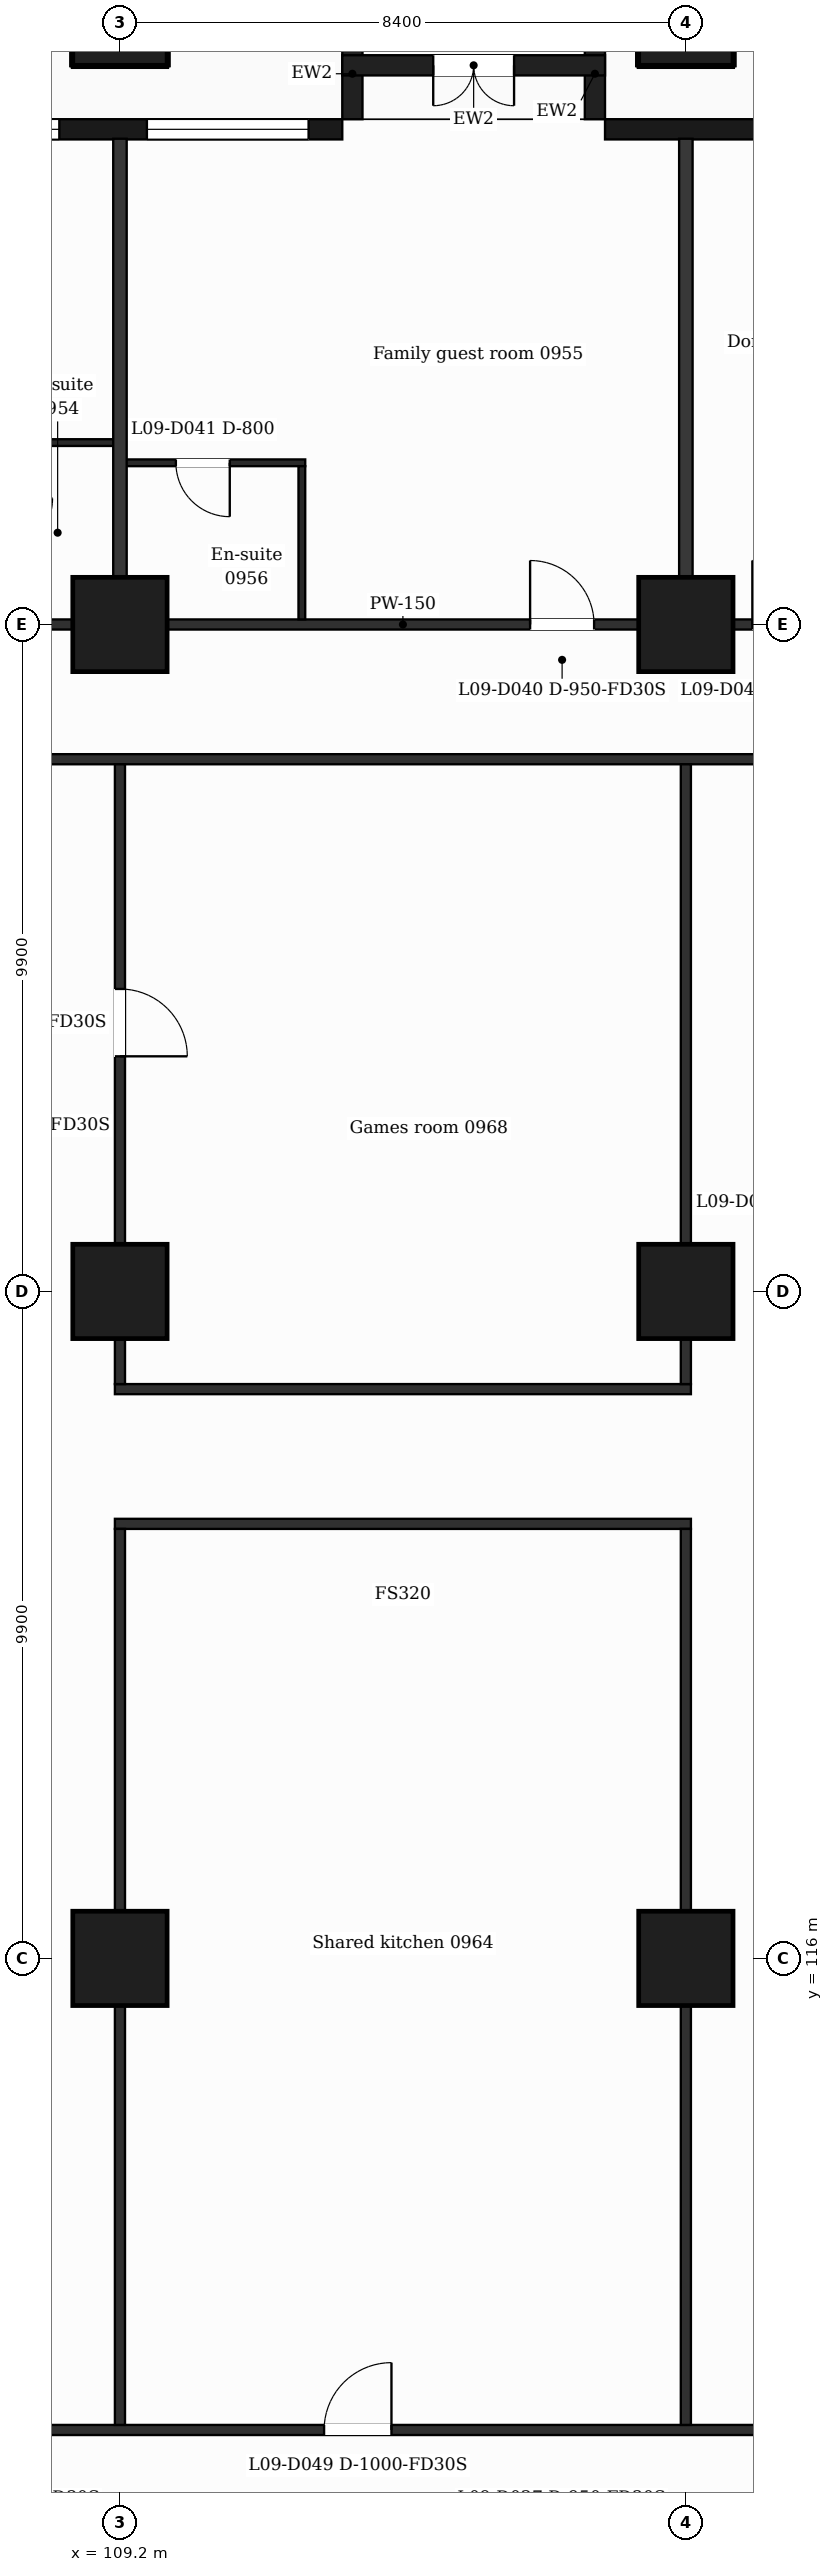
"""IFC4 building model, lengths in metres.
Left out: names, types, materials, properties, quantities, classifications, styles, units other than length and angle.
Written with IfcOpenShell. Run it as: python <this file> out.ifc"""

import sys

from ifc_helpers import new_model, si_unit, direction, frame, frame_2d, origin, origin_2d, place, context, subcontext, project, spatial, rectangle, extrude, element, fill, save


model = new_model("IFC4")
c1 = context("Model", 3, precision=1e-05, world=origin(), true_north=direction((0.0, 1.0)))
c2 = subcontext(c1, "Body", "Model", "MODEL_VIEW")
j1 = project(units=[si_unit("LENGTHUNIT", "METRE"), si_unit("PLANEANGLEUNIT", "RADIAN")], contexts=[c1])
p1 = place(None, origin())
s1 = spatial("IfcSite", under=j1, at=p1, CompositionType="ELEMENT")
p2 = place(p1, origin())
s2 = spatial("IfcBuilding", under=s1, at=p2, CompositionType="ELEMENT")
p3 = place(p2, frame((0.0, 0.0, 49.5)))
s3 = spatial("IfcBuildingStorey", under=s2, at=p3, CompositionType="ELEMENT", Elevation=49.5)
for number, where, z_axis, x_axis in (
    (1, (109.2, 116.0, 0.0), (0.0, 0.0, 1.0), (1.0, 0.0, 0.0)),
    (2, (117.6, 116.0, 0.0), (0.0, 0.0, 1.0), (1.0, 0.0, 0.0)),
    (3, (109.2, 125.9, 0.0), (0.0, 0.0, 1.0), (1.0, 0.0, 0.0)),
    (4, (117.6, 125.9, 0.0), (0.0, 0.0, 1.0), (1.0, 0.0, 0.0)),
    (5, (109.2, 135.8, 0.0), (0.0, 0.0, 1.0), (1.0, 0.0, 0.0)),
    (6, (117.6, 135.8, 0.0), (0.0, 0.0, 1.0), (1.0, 0.0, 0.0)),
    (7, (109.2, 144.8, 0.0), (0.0, 0.0, 1.0), (1.0, 0.0, 0.0)),
    (8, (117.6, 144.8, 0.0), (0.0, 0.0, 1.0), (1.0, 0.0, 0.0)),
):
    element("IfcColumn", number, at=place(p3, frame(where, z_axis=z_axis, x_axis=x_axis)), inside=s3, PredefinedType="COLUMN", context=c2, shape_type="SweptSolid", body=[
        extrude(rectangle(XDim=1.4, YDim=1.4, at=origin_2d()), origin(), (0.0, 0.0, 1.0), 3.5),
    ])
p4 = place(p3, frame((130.65, 143.15, 0.0), z_axis=(0.0, 0.0, 1.0), x_axis=(-1.0, 0.0, 0.0)))
e9 = element("IfcWall", 9, at=p4, inside=s3, PredefinedType="SOLIDWALL", context=c2, shape_type="SweptSolid", body=[
    extrude(rectangle(XDim=14.25, YDim=0.3, at=frame_2d((7.125, 0.0))), origin(), (0.0, 0.0, 1.0), 3.18),
])
p5 = place(p4, frame((1.35, 0.0, 0.9)))
e10 = element("IfcOpeningElement", 10, at=p5, cuts=e9, PredefinedType="OPENING", context=c2, shape_type="SweptSolid", body=[
    extrude(rectangle(XDim=2.4, YDim=2.1, at=frame_2d((1.2, 1.05))), frame((0.0, 0.16, 0.0), z_axis=(0.0, -1.0, 0.0), x_axis=(1.0, 0.0, 0.0)), (0.0, 0.0, 1.0), 0.32),
])
p6 = place(p4, frame((6.15, 0.0, 0.0)))
e11 = element("IfcOpeningElement", 11, at=p6, cuts=e9, PredefinedType="OPENING", context=c2, shape_type="SweptSolid", body=[
    extrude(rectangle(XDim=1.2, YDim=2.4, at=frame_2d((0.6, 1.2))), frame((0.0, 0.16, 0.0), z_axis=(0.0, -1.0, 0.0), x_axis=(1.0, 0.0, 0.0)), (0.0, 0.0, 1.0), 0.32),
])
p7 = place(p4, frame((10.35, 0.0, 0.9)))
e12 = element("IfcOpeningElement", 12, at=p7, cuts=e9, PredefinedType="OPENING", context=c2, shape_type="SweptSolid", body=[
    extrude(rectangle(XDim=1.2, YDim=2.1, at=frame_2d((0.6, 1.05))), frame((0.0, 0.16, 0.0), z_axis=(0.0, -1.0, 0.0), x_axis=(1.0, 0.0, 0.0)), (0.0, 0.0, 1.0), 0.32),
])
p8 = place(p3, frame((112.5, 143.15, 0.0), z_axis=(0.0, 0.0, 1.0), x_axis=(-1.0, 0.0, 0.0)))
e13 = element("IfcWall", 13, at=p8, inside=s3, PredefinedType="SOLIDWALL", context=c2, shape_type="SweptSolid", body=[
    extrude(rectangle(XDim=16.5, YDim=0.3, at=frame_2d((8.25, 0.0))), origin(), (0.0, 0.0, 1.0), 3.18),
])
p9 = place(p8, frame((0.5, 0.0, 0.9)))
e14 = element("IfcOpeningElement", 14, at=p9, cuts=e13, PredefinedType="OPENING", context=c2, shape_type="SweptSolid", body=[
    extrude(rectangle(XDim=2.4, YDim=2.1, at=frame_2d((1.2, 1.05))), frame((0.0, 0.16, 0.0), z_axis=(0.0, -1.0, 0.0), x_axis=(1.0, 0.0, 0.0)), (0.0, 0.0, 1.0), 0.32),
])
p10 = place(p8, frame((4.2, 0.0, 0.9)))
e15 = element("IfcOpeningElement", 15, at=p10, cuts=e13, PredefinedType="OPENING", context=c2, shape_type="SweptSolid", body=[
    extrude(rectangle(XDim=2.4, YDim=2.1, at=frame_2d((1.2, 1.05))), frame((0.0, 0.16, 0.0), z_axis=(0.0, -1.0, 0.0), x_axis=(1.0, 0.0, 0.0)), (0.0, 0.0, 1.0), 0.32),
])
p11 = place(p8, frame((9.0, 0.0, 0.0)))
e16 = element("IfcOpeningElement", 16, at=p11, cuts=e13, PredefinedType="OPENING", context=c2, shape_type="SweptSolid", body=[
    extrude(rectangle(XDim=1.2, YDim=2.4, at=frame_2d((0.6, 1.2))), frame((0.0, 0.16, 0.0), z_axis=(0.0, -1.0, 0.0), x_axis=(1.0, 0.0, 0.0)), (0.0, 0.0, 1.0), 0.32),
])
p12 = place(p8, frame((12.6, 0.0, 0.9)))
e17 = element("IfcOpeningElement", 17, at=p12, cuts=e13, PredefinedType="OPENING", context=c2, shape_type="SweptSolid", body=[
    extrude(rectangle(XDim=2.4, YDim=2.1, at=frame_2d((1.2, 1.05))), frame((0.0, 0.16, 0.0), z_axis=(0.0, -1.0, 0.0), x_axis=(1.0, 0.0, 0.0)), (0.0, 0.0, 1.0), 0.32),
])
for number, where, z_axis, x_axis in (
    (18, (116.25, 143.3, 0.0), (0.0, 0.0, 1.0), (0.0, 1.0, 0.0)),
    (19, (112.65, 143.3, 0.0), (0.0, 0.0, 1.0), (0.0, 1.0, 0.0)),
):
    element("IfcWall", number, at=place(p3, frame(where, z_axis=z_axis, x_axis=x_axis)), inside=s3, PredefinedType="SOLIDWALL", context=c2, shape_type="SweptSolid", body=[
        extrude(rectangle(XDim=1.35, YDim=0.3, at=frame_2d((0.675, 0.0))), origin(), (0.0, 0.0, 1.0), 3.18),
    ])
p13 = place(p3, frame((116.4, 144.1, 0.0), z_axis=(0.0, 0.0, 1.0), x_axis=(-1.0, 0.0, 0.0)))
e20 = element("IfcWall", 20, at=p13, inside=s3, PredefinedType="SOLIDWALL", context=c2, shape_type="SweptSolid", body=[
    extrude(rectangle(XDim=3.9, YDim=0.3, at=frame_2d((1.95, 0.0))), origin(), (0.0, 0.0, 1.0), 3.18),
])
p14 = place(p13, frame((1.35, 0.0, 0.0)))
e21 = element("IfcOpeningElement", 21, at=p14, cuts=e20, PredefinedType="OPENING", context=c2, shape_type="SweptSolid", body=[
    extrude(rectangle(XDim=1.2, YDim=2.4, at=frame_2d((0.6, 1.2))), frame((0.0, 0.16, 0.0), z_axis=(0.0, -1.0, 0.0), x_axis=(1.0, 0.0, 0.0)), (0.0, 0.0, 1.0), 0.32),
])
p15 = place(p3, frame((100.725, 109.0, 0.0), z_axis=(0.0, 0.0, 1.0), x_axis=(1.0, 0.0, 0.0)))
e22 = element("IfcWall", 22, at=p15, inside=s3, PredefinedType="PARTITIONING", context=c2, shape_type="SweptSolid", body=[
    extrude(rectangle(XDim=25.35, YDim=0.15, at=frame_2d((12.675, 0.0))), origin(), (0.0, 0.0, 1.0), 3.18),
])
p16 = place(p15, frame((1.975, 0.0, 0.0)))
e23 = element("IfcOpeningElement", 23, at=p16, cuts=e22, PredefinedType="OPENING", context=c2, shape_type="SweptSolid", body=[
    extrude(rectangle(XDim=1.0, YDim=2.1, at=frame_2d((0.5, 1.05))), frame((0.0, 0.085, 0.0), z_axis=(0.0, -1.0, 0.0), x_axis=(1.0, 0.0, 0.0)), (0.0, 0.0, 1.0), 0.17),
])
p17 = place(p15, frame((11.505, 0.0, 0.0)))
e24 = element("IfcOpeningElement", 24, at=p17, cuts=e22, PredefinedType="OPENING", context=c2, shape_type="SweptSolid", body=[
    extrude(rectangle(XDim=1.0, YDim=2.1, at=frame_2d((0.5, 1.05))), frame((0.0, 0.085, 0.0), z_axis=(0.0, -1.0, 0.0), x_axis=(1.0, 0.0, 0.0)), (0.0, 0.0, 1.0), 0.17),
])
p18 = place(p15, frame((22.065, 0.0, 0.0)))
e25 = element("IfcOpeningElement", 25, at=p18, cuts=e22, PredefinedType="OPENING", context=c2, shape_type="SweptSolid", body=[
    extrude(rectangle(XDim=1.0, YDim=2.1, at=frame_2d((0.5, 1.05))), frame((0.0, 0.085, 0.0), z_axis=(0.0, -1.0, 0.0), x_axis=(1.0, 0.0, 0.0)), (0.0, 0.0, 1.0), 0.17),
])
for number, where, z_axis, x_axis in (
    (26, (109.125, 122.45, 0.0), (0.0, 0.0, 1.0), (1.0, 0.0, 0.0)),
    (27, (109.125, 124.45, 0.0), (0.0, 0.0, 1.0), (1.0, 0.0, 0.0)),
):
    element("IfcWall", number, at=place(p3, frame(where, z_axis=z_axis, x_axis=x_axis)), inside=s3, PredefinedType="PARTITIONING", context=c2, shape_type="SweptSolid", body=[
        extrude(rectangle(XDim=8.55, YDim=0.15, at=frame_2d((4.275, 0.0))), origin(), (0.0, 0.0, 1.0), 3.18),
    ])
p19 = place(p3, frame((100.725, 133.8, 0.0), z_axis=(0.0, 0.0, 1.0), x_axis=(1.0, 0.0, 0.0)))
e28 = element("IfcWall", 28, at=p19, inside=s3, PredefinedType="PARTITIONING", context=c2, shape_type="SweptSolid", body=[
    extrude(rectangle(XDim=25.35, YDim=0.15, at=frame_2d((12.675, 0.0))), origin(), (0.0, 0.0, 1.0), 3.18),
])
p20 = place(p3, frame((90.895, 135.8, 0.0), z_axis=(0.0, 0.0, 1.0), x_axis=(1.0, 0.0, 0.0)))
e29 = element("IfcWall", 29, at=p20, inside=s3, PredefinedType="PARTITIONING", context=c2, shape_type="SweptSolid", body=[
    extrude(rectangle(XDim=45.011, YDim=0.15, at=frame_2d((22.505, 0.0))), origin(), (0.0, 0.0, 1.0), 3.18),
])
p21 = place(p20, frame((7.675, 0.0, 0.0)))
e30 = element("IfcOpeningElement", 30, at=p21, cuts=e29, PredefinedType="OPENING", context=c2, shape_type="SweptSolid", body=[
    extrude(rectangle(XDim=1.0, YDim=2.1, at=frame_2d((0.5, 1.05))), frame((0.0, 0.085, 0.0), z_axis=(0.0, -1.0, 0.0), x_axis=(1.0, 0.0, 0.0)), (0.0, 0.0, 1.0), 0.17),
])
p22 = place(p20, frame((13.969, 0.0, 0.0)))
e31 = element("IfcOpeningElement", 31, at=p22, cuts=e29, PredefinedType="OPENING", context=c2, shape_type="SweptSolid", body=[
    extrude(rectangle(XDim=0.95, YDim=2.1, at=frame_2d((0.475, 1.05))), frame((0.0, 0.085, 0.0), z_axis=(0.0, -1.0, 0.0), x_axis=(1.0, 0.0, 0.0)), (0.0, 0.0, 1.0), 0.17),
])
p23 = place(p20, frame((24.393, 0.0, 0.0)))
e32 = element("IfcOpeningElement", 32, at=p23, cuts=e29, PredefinedType="OPENING", context=c2, shape_type="SweptSolid", body=[
    extrude(rectangle(XDim=0.95, YDim=2.1, at=frame_2d((0.475, 1.05))), frame((0.0, 0.085, 0.0), z_axis=(0.0, -1.0, 0.0), x_axis=(1.0, 0.0, 0.0)), (0.0, 0.0, 1.0), 0.17),
])
p24 = place(p20, frame((27.692, 0.0, 0.0)))
e33 = element("IfcOpeningElement", 33, at=p24, cuts=e29, PredefinedType="OPENING", context=c2, shape_type="SweptSolid", body=[
    extrude(rectangle(XDim=0.95, YDim=2.1, at=frame_2d((0.475, 1.05))), frame((0.0, 0.085, 0.0), z_axis=(0.0, -1.0, 0.0), x_axis=(1.0, 0.0, 0.0)), (0.0, 0.0, 1.0), 0.17),
])
p25 = place(p20, frame((32.531, 0.0, 0.0)))
e34 = element("IfcOpeningElement", 34, at=p25, cuts=e29, PredefinedType="OPENING", context=c2, shape_type="SweptSolid", body=[
    extrude(rectangle(XDim=0.95, YDim=2.1, at=frame_2d((0.475, 1.05))), frame((0.0, 0.085, 0.0), z_axis=(0.0, -1.0, 0.0), x_axis=(1.0, 0.0, 0.0)), (0.0, 0.0, 1.0), 0.17),
])
p26 = place(p20, frame((36.335, 0.0, 0.0)))
e35 = element("IfcOpeningElement", 35, at=p26, cuts=e29, PredefinedType="OPENING", context=c2, shape_type="SweptSolid", body=[
    extrude(rectangle(XDim=1.0, YDim=2.1, at=frame_2d((0.5, 1.05))), frame((0.0, 0.085, 0.0), z_axis=(0.0, -1.0, 0.0), x_axis=(1.0, 0.0, 0.0)), (0.0, 0.0, 1.0), 0.17),
])
p27 = place(p3, frame((109.2, 138.2, 0.0), z_axis=(0.0, 0.0, 1.0), x_axis=(1.0, 0.0, 0.0)))
e36 = element("IfcWall", 36, at=p27, inside=s3, PredefinedType="PARTITIONING", context=c2, shape_type="SweptSolid", body=[
    extrude(rectangle(XDim=2.75, YDim=0.1, at=frame_2d((1.375, 0.0))), origin(), (0.0, 0.0, 1.0), 3.18),
])
p28 = place(p27, frame((0.83, 0.0, 0.0)))
e37 = element("IfcOpeningElement", 37, at=p28, cuts=e36, PredefinedType="OPENING", context=c2, shape_type="SweptSolid", body=[
    extrude(rectangle(XDim=0.8, YDim=2.1, at=frame_2d((0.4, 1.05))), frame((0.0, 0.06, 0.0), z_axis=(0.0, -1.0, 0.0), x_axis=(1.0, 0.0, 0.0)), (0.0, 0.0, 1.0), 0.12),
])
p29 = place(p3, frame((107.35, 138.5, 0.0), z_axis=(0.0, 0.0, 1.0), x_axis=(1.0, 0.0, 0.0)))
e38 = element("IfcWall", 38, at=p29, inside=s3, PredefinedType="PARTITIONING", context=c2, shape_type="SweptSolid", body=[
    extrude(rectangle(XDim=1.85, YDim=0.1, at=frame_2d((0.925, 0.0))), origin(), (0.0, 0.0, 1.0), 3.18),
])
p30 = place(p3, frame((109.2, 135.875, 0.0), z_axis=(0.0, 0.0, 1.0), x_axis=(0.0, 1.0, 0.0)))
e39 = element("IfcWall", 39, at=p30, inside=s3, PredefinedType="PARTITIONING", context=c2, shape_type="SweptSolid", body=[
    extrude(rectangle(XDim=7.135, YDim=0.2, at=frame_2d((3.567, 0.0))), origin(), (0.0, 0.0, 1.0), 3.18),
])
p31 = place(p3, frame((109.2, 109.075, 0.0), z_axis=(0.0, 0.0, 1.0), x_axis=(0.0, 1.0, 0.0)))
e40 = element("IfcWall", 40, at=p31, inside=s3, PredefinedType="PARTITIONING", context=c2, shape_type="SweptSolid", body=[
    extrude(rectangle(XDim=13.3, YDim=0.15, at=frame_2d((6.65, 0.0))), origin(), (0.0, 0.0, 1.0), 3.18),
])
p32 = place(p3, frame((109.2, 124.525, 0.0), z_axis=(0.0, 0.0, 1.0), x_axis=(0.0, 1.0, 0.0)))
e41 = element("IfcWall", 41, at=p32, inside=s3, PredefinedType="PARTITIONING", context=c2, shape_type="SweptSolid", body=[
    extrude(rectangle(XDim=9.2, YDim=0.15, at=frame_2d((4.6, 0.0))), origin(), (0.0, 0.0, 1.0), 3.18),
])
p33 = place(p32, frame((4.865, 0.0, 0.0)))
e42 = element("IfcOpeningElement", 42, at=p33, cuts=e41, PredefinedType="OPENING", context=c2, shape_type="SweptSolid", body=[
    extrude(rectangle(XDim=1.0, YDim=2.1, at=frame_2d((0.5, 1.05))), frame((0.0, 0.085, 0.0), z_axis=(0.0, -1.0, 0.0), x_axis=(1.0, 0.0, 0.0)), (0.0, 0.0, 1.0), 0.17),
])
p34 = place(p3, frame((111.9, 135.875, 0.0), z_axis=(0.0, 0.0, 1.0), x_axis=(0.0, 1.0, 0.0)))
e43 = element("IfcWall", 43, at=p34, inside=s3, PredefinedType="PARTITIONING", context=c2, shape_type="SweptSolid", body=[
    extrude(rectangle(XDim=2.275, YDim=0.1, at=frame_2d((1.137, 0.0))), origin(), (0.0, 0.0, 1.0), 3.18),
])
p35 = place(p3, frame((117.6, 135.875, 0.0), z_axis=(0.0, 0.0, 1.0), x_axis=(0.0, 1.0, 0.0)))
e44 = element("IfcWall", 44, at=p35, inside=s3, PredefinedType="PARTITIONING", context=c2, shape_type="SweptSolid", body=[
    extrude(rectangle(XDim=7.135, YDim=0.2, at=frame_2d((3.567, 0.0))), origin(), (0.0, 0.0, 1.0), 3.18),
])
p36 = place(p3, frame((117.6, 109.075, 0.0), z_axis=(0.0, 0.0, 1.0), x_axis=(0.0, 1.0, 0.0)))
e45 = element("IfcWall", 45, at=p36, inside=s3, PredefinedType="PARTITIONING", context=c2, shape_type="SweptSolid", body=[
    extrude(rectangle(XDim=13.3, YDim=0.15, at=frame_2d((6.65, 0.0))), origin(), (0.0, 0.0, 1.0), 3.18),
])
p37 = place(p3, frame((117.6, 124.525, 0.0), z_axis=(0.0, 0.0, 1.0), x_axis=(0.0, 1.0, 0.0)))
e46 = element("IfcWall", 46, at=p37, inside=s3, PredefinedType="PARTITIONING", context=c2, shape_type="SweptSolid", body=[
    extrude(rectangle(XDim=9.2, YDim=0.15, at=frame_2d((4.6, 0.0))), origin(), (0.0, 0.0, 1.0), 3.18),
])
p38 = place(p9, origin())
e47 = element("IfcWindow", 47, at=p38, inside=s3, PartitioningType="SINGLE_PANEL", PredefinedType="WINDOW", context=c2, shape_type="SweptSolid", body=[
    extrude(rectangle(XDim=2.4, YDim=2.1, at=frame_2d((1.2, 1.05))), frame((0.0, 0.03, 0.0), z_axis=(0.0, -1.0, 0.0), x_axis=(1.0, 0.0, 0.0)), (0.0, 0.0, 1.0), 0.06),
])
fill(e14, e47)
p39 = place(p10, origin())
e48 = element("IfcWindow", 48, at=p39, inside=s3, PartitioningType="SINGLE_PANEL", PredefinedType="WINDOW", context=c2, shape_type="SweptSolid", body=[
    extrude(rectangle(XDim=2.4, YDim=2.1, at=frame_2d((1.2, 1.05))), frame((0.0, 0.03, 0.0), z_axis=(0.0, -1.0, 0.0), x_axis=(1.0, 0.0, 0.0)), (0.0, 0.0, 1.0), 0.06),
])
fill(e15, e48)
p40 = place(p14, origin())
e49 = element("IfcDoor", 49, at=p40, inside=s3, OperationType="DOUBLE_DOOR_SINGLE_SWING", PredefinedType="DOOR", context=c2, shape_type="SweptSolid", body=[
    extrude(rectangle(XDim=1.2, YDim=2.4, at=frame_2d((0.6, 1.2))), frame((0.0, 0.025, 0.0), z_axis=(0.0, -1.0, 0.0), x_axis=(1.0, 0.0, 0.0)), (0.0, 0.0, 1.0), 0.05),
])
fill(e21, e49)
p41 = place(p23, origin())
e50 = element("IfcDoor", 50, at=p41, inside=s3, OperationType="SINGLE_SWING_LEFT", PredefinedType="DOOR", context=c2, shape_type="SweptSolid", body=[
    extrude(rectangle(XDim=0.95, YDim=2.1, at=frame_2d((0.475, 1.05))), frame((0.0, 0.025, 0.0), z_axis=(0.0, -1.0, 0.0), x_axis=(1.0, 0.0, 0.0)), (0.0, 0.0, 1.0), 0.05),
])
fill(e32, e50)
p42 = place(p28, origin())
e51 = element("IfcDoor", 51, at=p42, inside=s3, OperationType="SINGLE_SWING_RIGHT", PredefinedType="DOOR", context=c2, shape_type="SweptSolid", body=[
    extrude(rectangle(XDim=0.8, YDim=2.1, at=frame_2d((0.4, 1.05))), frame((0.0, 0.025, 0.0), z_axis=(0.0, -1.0, 0.0), x_axis=(1.0, 0.0, 0.0)), (0.0, 0.0, 1.0), 0.05),
])
fill(e37, e51)
p43 = place(p24, origin())
e52 = element("IfcDoor", 52, at=p43, inside=s3, OperationType="SINGLE_SWING_LEFT", PredefinedType="DOOR", context=c2, shape_type="SweptSolid", body=[
    extrude(rectangle(XDim=0.95, YDim=2.1, at=frame_2d((0.475, 1.05))), frame((0.0, 0.025, 0.0), z_axis=(0.0, -1.0, 0.0), x_axis=(1.0, 0.0, 0.0)), (0.0, 0.0, 1.0), 0.05),
])
fill(e33, e52)
p44 = place(p17, origin())
e53 = element("IfcDoor", 53, at=p44, inside=s3, OperationType="SINGLE_SWING_RIGHT", PredefinedType="DOOR", context=c2, shape_type="SweptSolid", body=[
    extrude(rectangle(XDim=1.0, YDim=2.1, at=frame_2d((0.5, 1.05))), frame((0.0, 0.025, 0.0), z_axis=(0.0, -1.0, 0.0), x_axis=(1.0, 0.0, 0.0)), (0.0, 0.0, 1.0), 0.05),
])
fill(e24, e53)
p45 = place(p33, origin())
e54 = element("IfcDoor", 54, at=p45, inside=s3, OperationType="SINGLE_SWING_LEFT", PredefinedType="DOOR", context=c2, shape_type="SweptSolid", body=[
    extrude(rectangle(XDim=1.0, YDim=2.1, at=frame_2d((0.5, 1.05))), frame((0.0, 0.025, 0.0), z_axis=(0.0, -1.0, 0.0), x_axis=(1.0, 0.0, 0.0)), (0.0, 0.0, 1.0), 0.05),
])
fill(e42, e54)
save(model, sys.argv[1])
